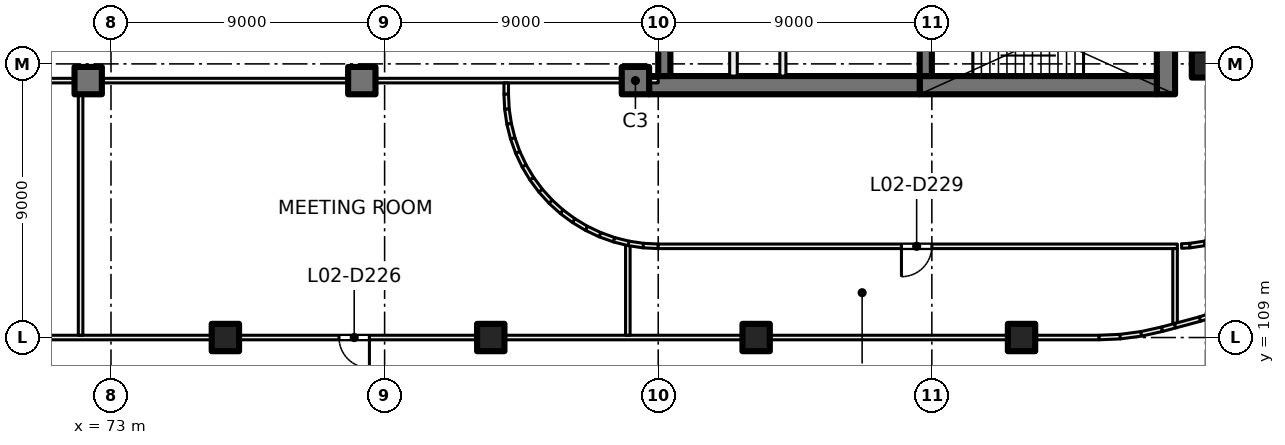
"""IFC4 building model, lengths in metres.
Left out: names, types, materials, properties, quantities, classifications, styles, units other than length and angle.
Written with IfcOpenShell. Run it as: python <this file> out.ifc"""

import sys

from ifc_helpers import new_model, si_unit, direction, frame, frame_2d, origin, origin_2d, place, context, subcontext, project, spatial, rectangle, extrude, element, fill, save


model = new_model("IFC4")
c1 = context("Model", 3, precision=1e-05, world=origin(), true_north=direction((0.0, 1.0)))
c2 = subcontext(c1, "Body", "Model", "MODEL_VIEW")
j1 = project(units=[si_unit("LENGTHUNIT", "METRE"), si_unit("PLANEANGLEUNIT", "RADIAN")], contexts=[c1])
p1 = place(None, origin())
s1 = spatial("IfcSite", under=j1, at=p1, CompositionType="ELEMENT")
p2 = place(p1, origin())
s2 = spatial("IfcBuilding", under=s1, at=p2, CompositionType="ELEMENT")
p3 = place(p2, frame((0.0, 0.0, 12.5)))
s3 = spatial("IfcBuildingStorey", under=s2, at=p3, CompositionType="ELEMENT", Elevation=12.5)
for number, where, z_axis, x_axis in (
    (1, (109.0, 118.0, 0.0), (0.0, 0.0, 1.0), (1.0, 0.0, 0.0)),
    (2, (76.762, 109.0, 0.0), (0.0, 0.0, 1.0), (1.0, 0.0, 0.0)),
    (3, (85.491, 109.0, 0.0), (0.0, 0.0, 1.0), (1.0, 0.0, 0.0)),
    (4, (94.221, 109.0, 0.0), (0.0, 0.0, 1.0), (1.0, 0.0, 0.0)),
    (5, (102.95, 109.0, 0.0), (0.0, 0.0, 1.0), (1.0, 0.0, 0.0)),
    (6, (72.25, 117.45, 0.0), (0.0, 0.0, 1.0), (1.0, 0.0, 0.0)),
    (7, (81.25, 117.45, 0.0), (0.0, 0.0, 1.0), (1.0, 0.0, 0.0)),
    (8, (90.25, 117.45, 0.0), (0.0, 0.0, 1.0), (1.0, 0.0, 0.0)),
):
    element("IfcColumn", number, at=place(p3, frame(where, z_axis=z_axis, x_axis=x_axis)), inside=s3, PredefinedType="COLUMN", context=c2, shape_type="SweptSolid", body=[
        extrude(rectangle(XDim=0.9, YDim=0.9, at=origin_2d()), origin(), (0.0, 0.0, 1.0), 5.0),
    ])
p4 = place(p3, frame((107.7, 120.8, 0.0), z_axis=(0.0, 0.0, 1.0), x_axis=(0.0, -1.0, 0.0)))
e9 = element("IfcWall", 9, at=p4, inside=s3, PredefinedType="SHEAR", context=c2, shape_type="SweptSolid", body=[
    extrude(rectangle(XDim=3.8, YDim=0.6, at=frame_2d((1.9, 0.0))), origin(), (0.0, 0.0, 1.0), 5.0),
])
p5 = place(p3, frame((107.4, 117.3, 0.0), z_axis=(0.0, 0.0, 1.0), x_axis=(-1.0, 0.0, 0.0)))
e10 = element("IfcWall", 10, at=p5, inside=s3, PredefinedType="SHEAR", context=c2, shape_type="SweptSolid", body=[
    extrude(rectangle(XDim=7.8, YDim=0.6, at=frame_2d((3.9, 0.0))), origin(), (0.0, 0.0, 1.0), 5.0),
])
p6 = place(p3, frame((99.6, 117.3, 0.0), z_axis=(0.0, 0.0, 1.0), x_axis=(-1.0, 0.0, 0.0)))
e11 = element("IfcWall", 11, at=p6, inside=s3, PredefinedType="SHEAR", context=c2, shape_type="SweptSolid", body=[
    extrude(rectangle(XDim=8.9, YDim=0.6, at=frame_2d((4.45, 0.0))), origin(), (0.0, 0.0, 1.0), 5.0),
])
p7 = place(p3, frame((99.8, 120.4, 0.0), z_axis=(0.0, 0.0, 1.0), x_axis=(0.0, -1.0, 0.0)))
e12 = element("IfcWall", 12, at=p7, inside=s3, PredefinedType="SHEAR", context=c2, shape_type="SweptSolid", body=[
    extrude(rectangle(XDim=2.8, YDim=0.4, at=frame_2d((1.4, 0.0))), origin(), (0.0, 0.0, 1.0), 5.0),
])
p8 = place(p7, frame((0.9, 0.0, 0.0)))
e13 = element("IfcOpeningElement", 13, at=p8, cuts=e12, PredefinedType="OPENING", context=c2, shape_type="SweptSolid", body=[
    extrude(rectangle(XDim=1.0, YDim=2.1, at=frame_2d((0.5, 1.05))), frame((0.0, 0.21, 0.0), z_axis=(0.0, -1.0, 0.0), x_axis=(1.0, 0.0, 0.0)), (0.0, 0.0, 1.0), 0.42),
])
p9 = place(p3, frame((91.2, 126.2, 0.0), z_axis=(0.0, 0.0, 1.0), x_axis=(0.0, -1.0, 0.0)))
e14 = element("IfcWall", 14, at=p9, inside=s3, PredefinedType="SHEAR", context=c2, shape_type="SweptSolid", body=[
    extrude(rectangle(XDim=8.6, YDim=0.4, at=frame_2d((4.3, 0.0))), origin(), (0.0, 0.0, 1.0), 5.0),
])
p10 = place(p3, frame((95.1, 117.6, 0.0), z_axis=(0.0, 0.0, 1.0), x_axis=(0.0, 1.0, 0.0)))
e15 = element("IfcWall", 15, at=p10, inside=s3, PredefinedType="PARTITIONING", context=c2, shape_type="SweptSolid", body=[
    extrude(rectangle(XDim=8.4, YDim=0.2, at=frame_2d((4.2, 0.0))), origin(), (0.0, 0.0, 1.0), 4.6),
])
p11 = place(p10, frame((1.65, 0.0, 0.0)))
e16 = element("IfcOpeningElement", 16, at=p11, cuts=e15, PredefinedType="OPENING", context=c2, shape_type="SweptSolid", body=[
    extrude(rectangle(XDim=1.5, YDim=2.1, at=frame_2d((0.75, 1.05))), frame((0.0, 0.11, 0.0), z_axis=(0.0, -1.0, 0.0), x_axis=(1.0, 0.0, 0.0)), (0.0, 0.0, 1.0), 0.22),
])
p12 = place(p3, frame((93.475, 117.6, 0.0), z_axis=(0.0, 0.0, 1.0), x_axis=(0.0, 1.0, 0.0)))
e17 = element("IfcWall", 17, at=p12, inside=s3, PredefinedType="PARTITIONING", context=c2, shape_type="SweptSolid", body=[
    extrude(rectangle(XDim=8.4, YDim=0.25, at=frame_2d((4.2, 0.0))), origin(), (0.0, 0.0, 1.0), 4.6),
])
p13 = place(p12, frame((3.8, 0.0, 0.0)))
e18 = element("IfcOpeningElement", 18, at=p13, cuts=e17, PredefinedType="OPENING", context=c2, shape_type="SweptSolid", body=[
    extrude(rectangle(XDim=0.8, YDim=2.1, at=frame_2d((0.4, 1.05))), frame((0.0, 0.135, 0.0), z_axis=(0.0, -1.0, 0.0), x_axis=(1.0, 0.0, 0.0)), (0.0, 0.0, 1.0), 0.27),
])
p14 = place(p3, frame((49.825, 117.45, 0.0), z_axis=(0.0, 0.0, 1.0), x_axis=(1.0, 0.0, 0.0)))
e19 = element("IfcWall", 19, at=p14, inside=s3, PredefinedType="PARTITIONING", context=c2, shape_type="SweptSolid", body=[
    extrude(rectangle(XDim=41.175, YDim=0.15, at=frame_2d((20.587, 0.0))), origin(), (0.0, 0.0, 1.0), 4.6),
])
p15 = place(p3, frame((59.384, 109.0, 0.0), z_axis=(0.0, 0.0, 1.0), x_axis=(1.0, 0.0, 0.0)))
e20 = element("IfcWall", 20, at=p15, inside=s3, PredefinedType="PARTITIONING", context=c2, shape_type="SweptSolid", body=[
    extrude(rectangle(XDim=46.116, YDim=0.15, at=frame_2d((23.058, 0.0))), origin(), (0.0, 0.0, 1.0), 4.6),
])
p16 = place(p15, frame((21.116, 0.0, 0.0)))
e21 = element("IfcOpeningElement", 21, at=p16, cuts=e20, PredefinedType="OPENING", context=c2, shape_type="SweptSolid", body=[
    extrude(rectangle(XDim=1.0, YDim=2.1, at=frame_2d((0.5, 1.05))), frame((0.0, 0.085, 0.0), z_axis=(0.0, -1.0, 0.0), x_axis=(1.0, 0.0, 0.0)), (0.0, 0.0, 1.0), 0.17),
])
p17 = place(p3, frame((72.0, 109.075, 0.0), z_axis=(0.0, 0.0, 1.0), x_axis=(0.0, 1.0, 0.0)))
e22 = element("IfcWall", 22, at=p17, inside=s3, PredefinedType="PARTITIONING", context=c2, shape_type="SweptSolid", body=[
    extrude(rectangle(XDim=8.3, YDim=0.15, at=frame_2d((4.15, 0.0))), origin(), (0.0, 0.0, 1.0), 4.6),
])
p18 = place(p3, frame((86.0, 116.998, 0.0), z_axis=(0.0, 0.0, 1.0), x_axis=(0.0, 1.0, 0.0)))
e23 = element("IfcWall", 23, at=p18, inside=s3, PredefinedType="PARTITIONING", context=c2, shape_type="SweptSolid", body=[
    extrude(rectangle(XDim=0.377, YDim=0.15, at=frame_2d((0.188, 0.0))), origin(), (0.0, 0.0, 1.0), 4.6),
])
p19 = place(p3, frame((86.0, 117.002, 0.0), z_axis=(0.0, 0.0, 1.0), x_axis=(0.048196018647, -0.998837896651, 0.0)))
e24 = element("IfcWall", 24, at=p19, inside=s3, PredefinedType="PARTITIONING", context=c2, shape_type="SweptSolid", body=[
    extrude(rectangle(XDim=0.496, YDim=0.15, at=frame_2d((0.248, 0.0))), origin(), (0.0, 0.0, 1.0), 4.6),
])
p20 = place(p3, frame((86.023, 116.514, 0.0), z_axis=(0.0, 0.0, 1.0), x_axis=(0.148412307247, -0.988925572052, 0.0)))
e25 = element("IfcWall", 25, at=p20, inside=s3, PredefinedType="PARTITIONING", context=c2, shape_type="SweptSolid", body=[
    extrude(rectangle(XDim=0.499, YDim=0.15, at=frame_2d((0.249, 0.0))), origin(), (0.0, 0.0, 1.0), 4.6),
])
p21 = place(p3, frame((86.095, 116.029, 0.0), z_axis=(0.0, 0.0, 1.0), x_axis=(0.242650732785, -0.970113715952, 0.0)))
e26 = element("IfcWall", 26, at=p21, inside=s3, PredefinedType="PARTITIONING", context=c2, shape_type="SweptSolid", body=[
    extrude(rectangle(XDim=0.499, YDim=0.15, at=frame_2d((0.25, 0.0))), origin(), (0.0, 0.0, 1.0), 4.6),
])
for number, where, z_axis, x_axis in (
    (27, (86.214, 115.553, 0.0), (0.0, 0.0, 1.0), (0.337, -0.941, 0.0)),
    (28, (86.379, 115.09, 0.0), (0.0, 0.0, 1.0), (0.428, -0.904, 0.0)),
):
    element("IfcWall", number, at=place(p3, frame(where, z_axis=z_axis, x_axis=x_axis)), inside=s3, PredefinedType="PARTITIONING", context=c2, shape_type="SweptSolid", body=[
        extrude(rectangle(XDim=0.498, YDim=0.15, at=frame_2d((0.249, 0.0))), origin(), (0.0, 0.0, 1.0), 4.6),
    ])
p22 = place(p3, frame((86.588, 114.646, 0.0), z_axis=(0.0, 0.0, 1.0), x_axis=(0.515791778052, -0.85671397893, 0.0)))
e29 = element("IfcWall", 29, at=p22, inside=s3, PredefinedType="PARTITIONING", context=c2, shape_type="SweptSolid", body=[
    extrude(rectangle(XDim=0.499, YDim=0.15, at=frame_2d((0.249, 0.0))), origin(), (0.0, 0.0, 1.0), 4.6),
])
p23 = place(p3, frame((86.841, 114.225, 0.0), z_axis=(0.0, 0.0, 1.0), x_axis=(0.594570362092, -0.80404358372, 0.0)))
e30 = element("IfcWall", 30, at=p23, inside=s3, PredefinedType="PARTITIONING", context=c2, shape_type="SweptSolid", body=[
    extrude(rectangle(XDim=0.498, YDim=0.15, at=frame_2d((0.249, 0.0))), origin(), (0.0, 0.0, 1.0), 4.6),
])
for number, where, z_axis, x_axis in (
    (31, (87.133, 113.831, 0.0), (0.0, 0.0, 1.0), (0.67, -0.742, 0.0)),
    (32, (87.461, 113.467, 0.0), (0.0, 0.0, 1.0), (0.742, -0.67, 0.0)),
):
    element("IfcWall", number, at=place(p3, frame(where, z_axis=z_axis, x_axis=x_axis)), inside=s3, PredefinedType="PARTITIONING", context=c2, shape_type="SweptSolid", body=[
        extrude(rectangle(XDim=0.499, YDim=0.15, at=frame_2d((0.249, 0.0))), origin(), (0.0, 0.0, 1.0), 4.6),
    ])
p24 = place(p3, frame((87.825, 113.137, 0.0), z_axis=(0.0, 0.0, 1.0), x_axis=(0.80404358372, -0.594570362092, 0.0)))
e33 = element("IfcWall", 33, at=p24, inside=s3, PredefinedType="PARTITIONING", context=c2, shape_type="SweptSolid", body=[
    extrude(rectangle(XDim=0.498, YDim=0.15, at=frame_2d((0.249, 0.0))), origin(), (0.0, 0.0, 1.0), 4.6),
])
p25 = place(p3, frame((88.219, 112.845, 0.0), z_axis=(0.0, 0.0, 1.0), x_axis=(0.85671397893, -0.515791778052, 0.0)))
e34 = element("IfcWall", 34, at=p25, inside=s3, PredefinedType="PARTITIONING", context=c2, shape_type="SweptSolid", body=[
    extrude(rectangle(XDim=0.499, YDim=0.15, at=frame_2d((0.249, 0.0))), origin(), (0.0, 0.0, 1.0), 4.6),
])
for number, where, z_axis, x_axis in (
    (35, (88.64, 112.592, 0.0), (0.0, 0.0, 1.0), (0.904, -0.428, 0.0)),
    (36, (89.084, 112.382, 0.0), (0.0, 0.0, 1.0), (0.941, -0.337, 0.0)),
):
    element("IfcWall", number, at=place(p3, frame(where, z_axis=z_axis, x_axis=x_axis)), inside=s3, PredefinedType="PARTITIONING", context=c2, shape_type="SweptSolid", body=[
        extrude(rectangle(XDim=0.498, YDim=0.15, at=frame_2d((0.249, 0.0))), origin(), (0.0, 0.0, 1.0), 4.6),
    ])
p26 = place(p3, frame((89.545, 112.216, 0.0), z_axis=(0.0, 0.0, 1.0), x_axis=(0.970116111764, -0.242641154168, 0.0)))
e37 = element("IfcWall", 37, at=p26, inside=s3, PredefinedType="PARTITIONING", context=c2, shape_type="SweptSolid", body=[
    extrude(rectangle(XDim=0.544, YDim=0.15, at=frame_2d((0.272, 0.0))), origin(), (0.0, 0.0, 1.0), 4.6),
])
p27 = place(p3, frame((90.0, 109.075, 0.0), z_axis=(0.0, 0.0, 1.0), x_axis=(0.0, 1.0, 0.0)))
e38 = element("IfcWall", 38, at=p27, inside=s3, PredefinedType="PARTITIONING", context=c2, shape_type="SweptSolid", body=[
    extrude(rectangle(XDim=2.95, YDim=0.15, at=frame_2d((1.475, 0.0))), origin(), (0.0, 0.0, 1.0), 4.6),
])
p28 = place(p3, frame((90.025, 112.096, 0.0), z_axis=(0.0, 0.0, 1.0), x_axis=(0.989041138834, -0.147640189971, 0.0)))
e39 = element("IfcWall", 39, at=p28, inside=s3, PredefinedType="PARTITIONING", context=c2, shape_type="SweptSolid", body=[
    extrude(rectangle(XDim=0.494, YDim=0.15, at=frame_2d((0.247, 0.0))), origin(), (0.0, 0.0, 1.0), 4.6),
])
p29 = place(p3, frame((90.506, 112.024, 0.0), z_axis=(0.0, 0.0, 1.0), x_axis=(0.998837896651, -0.048196018647, 0.0)))
e40 = element("IfcWall", 40, at=p29, inside=s3, PredefinedType="PARTITIONING", context=c2, shape_type="SweptSolid", body=[
    extrude(rectangle(XDim=0.496, YDim=0.15, at=frame_2d((0.248, 0.0))), origin(), (0.0, 0.0, 1.0), 4.6),
])
p30 = place(p3, frame((108.075, 112.0, 0.0), z_axis=(0.0, 0.0, 1.0), x_axis=(-1.0, 0.0, 0.0)))
e41 = element("IfcWall", 41, at=p30, inside=s3, PredefinedType="PARTITIONING", context=c2, shape_type="SweptSolid", body=[
    extrude(rectangle(XDim=17.077, YDim=0.15, at=frame_2d((8.539, 0.0))), origin(), (0.0, 0.0, 1.0), 4.6),
])
p31 = place(p30, frame((8.075, 0.0, 0.0)))
e42 = element("IfcOpeningElement", 42, at=p31, cuts=e41, PredefinedType="OPENING", context=c2, shape_type="SweptSolid", body=[
    extrude(rectangle(XDim=1.0, YDim=2.1, at=frame_2d((0.5, 1.05))), frame((0.0, 0.085, 0.0), z_axis=(0.0, -1.0, 0.0), x_axis=(1.0, 0.0, 0.0)), (0.0, 0.0, 1.0), 0.17),
])
p32 = place(p3, frame((105.5, 109.0, 0.0), z_axis=(0.0, 0.0, 1.0), x_axis=(0.999080978163, 0.042862560277, 0.0)))
e43 = element("IfcWall", 43, at=p32, inside=s3, PredefinedType="PARTITIONING", context=c2, shape_type="SweptSolid", body=[
    extrude(rectangle(XDim=0.701, YDim=0.15, at=frame_2d((0.35, 0.0))), origin(), (0.0, 0.0, 1.0), 4.6),
])
p33 = place(p3, frame((106.194, 109.03, 0.0), z_axis=(0.0, 0.0, 1.0), x_axis=(0.991417667389, 0.130732585032, 0.0)))
e44 = element("IfcWall", 44, at=p33, inside=s3, PredefinedType="PARTITIONING", context=c2, shape_type="SweptSolid", body=[
    extrude(rectangle(XDim=0.704, YDim=0.15, at=frame_2d((0.352, 0.0))), origin(), (0.0, 0.0, 1.0), 4.6),
])
p34 = place(p3, frame((106.886, 109.121, 0.0), z_axis=(0.0, 0.0, 1.0), x_axis=(0.976301537339, 0.216414667222, 0.0)))
e45 = element("IfcWall", 45, at=p34, inside=s3, PredefinedType="PARTITIONING", context=c2, shape_type="SweptSolid", body=[
    extrude(rectangle(XDim=0.702, YDim=0.15, at=frame_2d((0.351, 0.0))), origin(), (0.0, 0.0, 1.0), 4.6),
])
p35 = place(p3, frame((107.571, 109.273, 0.0), z_axis=(0.0, 0.0, 1.0), x_axis=(0.965896509383, 0.25892843251, 0.0)))
e46 = element("IfcWall", 46, at=p35, inside=s3, PredefinedType="PARTITIONING", context=c2, shape_type="SweptSolid", body=[
    extrude(rectangle(XDim=0.444, YDim=0.15, at=frame_2d((0.222, 0.0))), origin(), (0.0, 0.0, 1.0), 4.6),
])
p36 = place(p3, frame((108.0, 109.466, 0.0), z_axis=(0.0, 0.0, 1.0), x_axis=(0.0, 1.0, 0.0)))
e47 = element("IfcWall", 47, at=p36, inside=s3, PredefinedType="PARTITIONING", context=c2, shape_type="SweptSolid", body=[
    extrude(rectangle(XDim=2.459, YDim=0.15, at=frame_2d((1.229, 0.0))), origin(), (0.0, 0.0, 1.0), 4.6),
])
p37 = place(p3, frame((108.0, 109.388, 0.0), z_axis=(0.0, 0.0, 1.0), x_axis=(0.965800850795, 0.259285010374, 0.0)))
e48 = element("IfcWall", 48, at=p37, inside=s3, PredefinedType="PARTITIONING", context=c2, shape_type="SweptSolid", body=[
    extrude(rectangle(XDim=0.852, YDim=0.15, at=frame_2d((0.426, 0.0))), origin(), (0.0, 0.0, 1.0), 4.6),
])
p38 = place(p3, frame((108.214, 112.01, 0.0), z_axis=(0.0, 0.0, 1.0), x_axis=(0.99876534507, 0.049676810357, 0.0)))
e49 = element("IfcWall", 49, at=p38, inside=s3, PredefinedType="PARTITIONING", context=c2, shape_type="SweptSolid", body=[
    extrude(rectangle(XDim=0.28, YDim=0.15, at=frame_2d((0.14, 0.0))), origin(), (0.0, 0.0, 1.0), 4.6),
])
p39 = place(p3, frame((108.486, 112.023, 0.0), z_axis=(0.0, 0.0, 1.0), x_axis=(0.988925572052, 0.148412307247, 0.0)))
e50 = element("IfcWall", 50, at=p39, inside=s3, PredefinedType="PARTITIONING", context=c2, shape_type="SweptSolid", body=[
    extrude(rectangle(XDim=0.499, YDim=0.15, at=frame_2d((0.249, 0.0))), origin(), (0.0, 0.0, 1.0), 4.6),
])
p40 = place(p3, frame((108.819, 109.607, 0.0), z_axis=(0.0, 0.0, 1.0), x_axis=(0.95125726357, 0.308398473578, 0.0)))
e51 = element("IfcWall", 51, at=p40, inside=s3, PredefinedType="PARTITIONING", context=c2, shape_type="SweptSolid", body=[
    extrude(rectangle(XDim=0.843, YDim=0.15, at=frame_2d((0.421, 0.0))), origin(), (0.0, 0.0, 1.0), 4.6),
])
p41 = place(p3, frame((108.971, 112.095, 0.0), z_axis=(0.0, 0.0, 1.0), x_axis=(0.970113715952, 0.242650732785, 0.0)))
e52 = element("IfcWall", 52, at=p41, inside=s3, PredefinedType="PARTITIONING", context=c2, shape_type="SweptSolid", body=[
    extrude(rectangle(XDim=0.499, YDim=0.15, at=frame_2d((0.25, 0.0))), origin(), (0.0, 0.0, 1.0), 4.6),
])
p42 = place(p16, origin())
e53 = element("IfcDoor", 53, at=p42, inside=s3, OperationType="SINGLE_SWING_RIGHT", PredefinedType="DOOR", context=c2, shape_type="SweptSolid", body=[
    extrude(rectangle(XDim=1.0, YDim=2.1, at=frame_2d((0.5, 1.05))), frame((0.0, 0.025, 0.0), z_axis=(0.0, -1.0, 0.0), x_axis=(1.0, 0.0, 0.0)), (0.0, 0.0, 1.0), 0.05),
])
fill(e21, e53)
p43 = place(p31, origin())
e54 = element("IfcDoor", 54, at=p43, inside=s3, OperationType="SINGLE_SWING_RIGHT", PredefinedType="DOOR", context=c2, shape_type="SweptSolid", body=[
    extrude(rectangle(XDim=1.0, YDim=2.1, at=frame_2d((0.5, 1.05))), frame((0.0, 0.025, 0.0), z_axis=(0.0, -1.0, 0.0), x_axis=(1.0, 0.0, 0.0)), (0.0, 0.0, 1.0), 0.05),
])
fill(e42, e54)
save(model, sys.argv[1])
